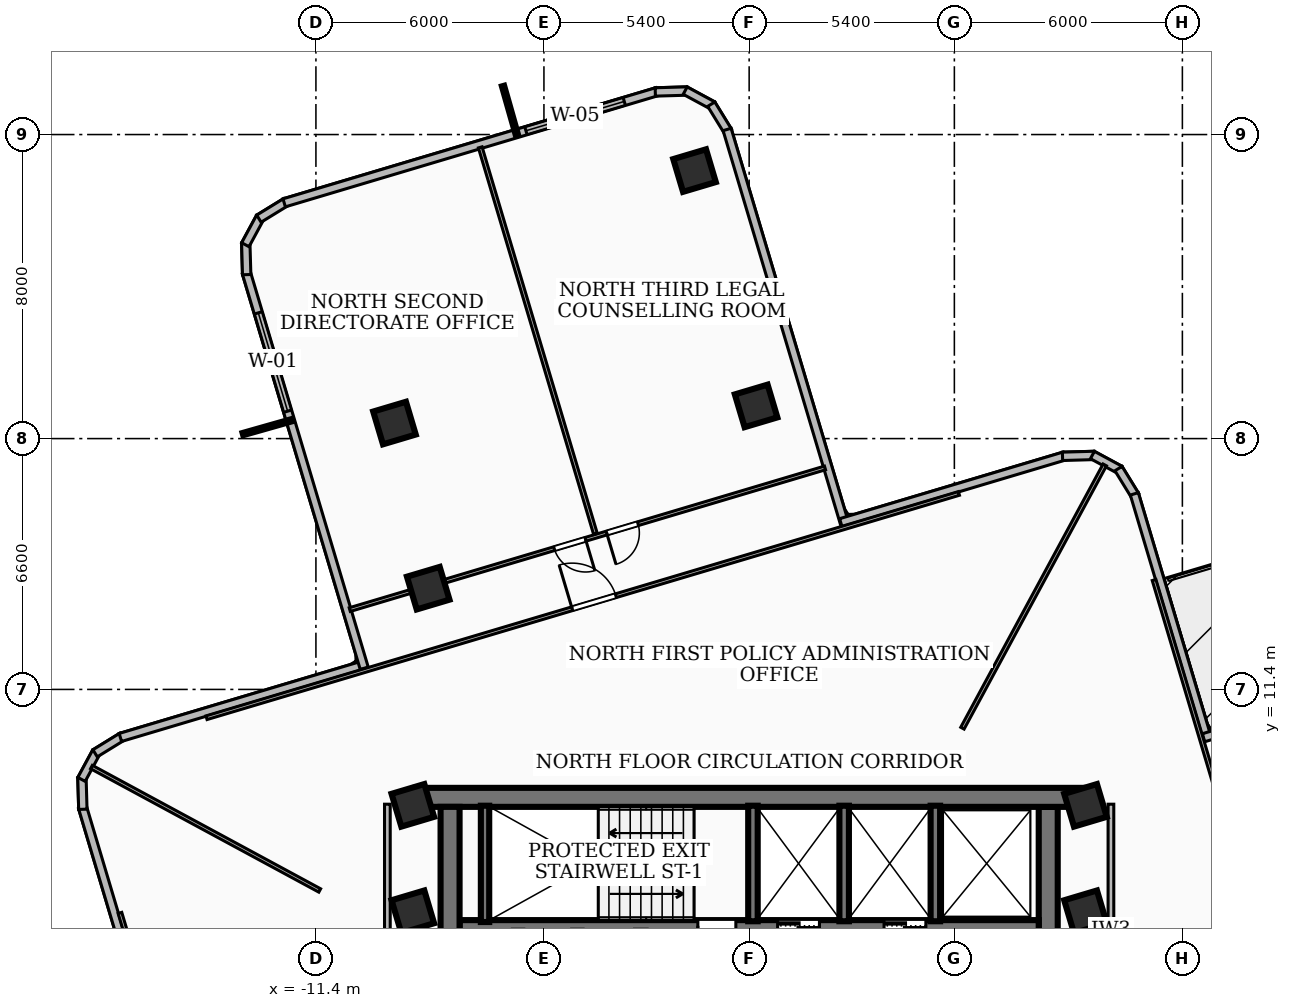
"""IFC4 building model, lengths in metres.
Left out: names, types, materials, properties, quantities, classifications, styles, units other than length and angle.
Written with IfcOpenShell. Run it as: python <this file> out.ifc"""

import sys

from ifc_helpers import new_model, si_unit, direction, frame, frame_2d, origin, origin_2d, place, context, subcontext, project, spatial, rectangle, extrude, element, fill, save


model = new_model("IFC4")
c1 = context("Model", 3, precision=1e-05, world=origin(), true_north=direction((0.0, 1.0)))
c2 = subcontext(c1, "Body", "Model", "MODEL_VIEW")
j1 = project(units=[si_unit("LENGTHUNIT", "METRE"), si_unit("PLANEANGLEUNIT", "RADIAN")], contexts=[c1])
p1 = place(None, origin())
s1 = spatial("IfcSite", under=j1, at=p1, CompositionType="ELEMENT")
p2 = place(p1, origin())
s2 = spatial("IfcBuilding", under=s1, at=p2, CompositionType="ELEMENT")
p3 = place(p2, frame((0.0, 0.0, 141.48)))
s3 = spatial("IfcBuildingStorey", under=s2, at=p3, CompositionType="ELEMENT", Elevation=141.48)
p4 = place(p3, frame((-8.78, 8.56, 0.0), z_axis=(0.0, 0.0, 1.0), x_axis=(1.0, 0.0, 0.0)))
e1 = element("IfcWall", 1, at=p4, inside=s3, PredefinedType="SHEAR", context=c2, shape_type="SweptSolid", body=[
    extrude(rectangle(XDim=17.56, YDim=0.5, at=frame_2d((8.78, 0.0))), origin(), (0.0, 0.0, 1.0), 3.32),
])
for number, where, z_axis, x_axis in (
    (2, (-7.87, 2.0, 0.0), (0.0, 0.0, 1.0), (0.0, 1.0, 0.0)),
    (3, (7.87, 8.31, 0.0), (0.0, 0.0, 1.0), (0.0, -1.0, 0.0)),
):
    element("IfcWall", number, at=place(p3, frame(where, z_axis=z_axis, x_axis=x_axis)), inside=s3, PredefinedType="SHEAR", context=c2, shape_type="SweptSolid", body=[
        extrude(rectangle(XDim=6.31, YDim=0.5, at=frame_2d((3.155, 0.0))), origin(), (0.0, 0.0, 1.0), 3.32),
    ])
p5 = place(p3, frame((7.62, 5.18, 0.0), z_axis=(0.0, 0.0, 1.0), x_axis=(-1.0, 0.0, 0.0)))
e4 = element("IfcWall", 4, at=p5, inside=s3, PredefinedType="SOLIDWALL", context=c2, shape_type="SweptSolid", body=[
    extrude(rectangle(XDim=15.24, YDim=0.3, at=frame_2d((7.62, 0.0))), origin(), (0.0, 0.0, 1.0), 3.32),
])
p6 = place(p5, frame((5.77, 0.0, 0.0)))
e5 = element("IfcOpeningElement", 5, at=p6, cuts=e4, PredefinedType="OPENING", context=c2, shape_type="SweptSolid", body=[
    extrude(rectangle(XDim=1.1, YDim=2.15, at=frame_2d((0.55, 1.075))), frame((0.0, 0.16, 0.0), z_axis=(0.0, -1.0, 0.0), x_axis=(1.0, 0.0, 0.0)), (0.0, 0.0, 1.0), 0.32),
])
p7 = place(p5, frame((2.97, 0.0, 0.0)))
e6 = element("IfcOpeningElement", 6, at=p7, cuts=e4, PredefinedType="OPENING", context=c2, shape_type="SweptSolid", body=[
    extrude(rectangle(XDim=1.1, YDim=2.15, at=frame_2d((0.55, 1.075))), frame((0.0, 0.16, 0.0), z_axis=(0.0, -1.0, 0.0), x_axis=(1.0, 0.0, 0.0)), (0.0, 0.0, 1.0), 0.32),
])
p8 = place(p5, frame((7.97, 0.0, 0.0)))
e7 = element("IfcOpeningElement", 7, at=p8, cuts=e4, PredefinedType="OPENING", context=c2, shape_type="SweptSolid", body=[
    extrude(rectangle(XDim=1.0, YDim=2.1, at=frame_2d((0.5, 1.05))), frame((0.0, 0.16, 0.0), z_axis=(0.0, -1.0, 0.0), x_axis=(1.0, 0.0, 0.0)), (0.0, 0.0, 1.0), 0.32),
])
p9 = place(p3, frame((-6.95, 5.28, 0.0), z_axis=(0.0, 0.0, 1.0), x_axis=(0.0, 1.0, 0.0)))
e8 = element("IfcWall", 8, at=p9, inside=s3, PredefinedType="SOLIDWALL", context=c2, shape_type="SweptSolid", body=[
    extrude(rectangle(XDim=3.06, YDim=0.22, at=frame_2d((1.53, 0.0))), origin(), (0.0, 0.0, 1.0), 3.32),
])
for number, where, z_axis, x_axis in (
    (9, (0.1, 5.3, 0.0), (0.0, 0.0, 1.0), (0.0, 1.0, 0.0)),
    (10, (2.5, 5.3, 0.0), (0.0, 0.0, 1.0), (0.0, 1.0, 0.0)),
    (11, (4.9, 5.3, 0.0), (0.0, 0.0, 1.0), (0.0, 1.0, 0.0)),
):
    element("IfcWall", number, at=place(p3, frame(where, z_axis=z_axis, x_axis=x_axis)), inside=s3, PredefinedType="SOLIDWALL", context=c2, shape_type="SweptSolid", body=[
        extrude(rectangle(XDim=3.04, YDim=0.25, at=frame_2d((1.52, 0.0))), origin(), (0.0, 0.0, 1.0), 3.32),
    ])
for number, where, z_axis, x_axis in (
    (12, (-8.85, 5.55, 0.0), (0.0, 0.0, 1.0), (0.958, 0.286, 0.0)),
    (13, (8.85, 5.55, 0.0), (0.0, 0.0, 1.0), (0.958, 0.286, 0.0)),
    (14, (-8.85, 8.35, 0.0), (0.0, 0.0, 1.0), (0.958, 0.286, 0.0)),
    (15, (8.85, 8.35, 0.0), (0.0, 0.0, 1.0), (0.958, 0.286, 0.0)),
    (16, (0.183, 18.86, 0.0), (0.0, 0.0, 1.0), (0.958, 0.286, 0.0)),
    (17, (-8.445, 14.064, 0.0), (0.0, 0.0, 1.0), (0.958, 0.286, 0.0)),
    (18, (-1.437, 25.052, 0.0), (0.0, 0.0, 1.0), (0.958, 0.286, 0.0)),
    (19, (-9.333, 18.409, 0.0), (0.0, 0.0, 1.0), (0.958, 0.286, 0.0)),
):
    element("IfcColumn", number, at=place(p3, frame(where, z_axis=z_axis, x_axis=x_axis)), inside=s3, PredefinedType="COLUMN", context=c2, shape_type="SweptSolid", body=[
        extrude(rectangle(XDim=0.9, YDim=0.9, at=origin_2d()), origin(), (0.0, 0.0, 1.0), 3.6),
    ])
p10 = place(p3, frame((-15.787, 2.412, 0.0), z_axis=(0.0, 0.0, 1.0), x_axis=(-0.285712854037, 0.958315274342, 0.0)))
e20 = element("IfcWall", 20, at=p10, inside=s3, PredefinedType="SOLIDWALL", context=c2, shape_type="SweptSolid", body=[
    extrude(rectangle(XDim=6.139, YDim=0.22, at=frame_2d((3.069, 0.0))), origin(), (0.0, 0.0, 1.0), 3.32),
])
p11 = place(p3, frame((-17.533, 8.246, 0.0), z_axis=(0.0, 0.0, 1.0), x_axis=(-0.028676726094, 0.999588738122, 0.0)))
e21 = element("IfcWall", 21, at=p11, inside=s3, PredefinedType="SOLIDWALL", context=c2, shape_type="SweptSolid", body=[
    extrude(rectangle(XDim=0.834, YDim=0.22, at=frame_2d((0.417, 0.0))), origin(), (0.0, 0.0, 1.0), 3.32),
])
p12 = place(p3, frame((-17.568, 9.033, 0.0), z_axis=(0.0, 0.0, 1.0), x_axis=(0.475928115507, 0.879484183411, 0.0)))
e22 = element("IfcWall", 22, at=p12, inside=s3, PredefinedType="SOLIDWALL", context=c2, shape_type="SweptSolid", body=[
    extrude(rectangle(XDim=0.82, YDim=0.22, at=frame_2d((0.41, 0.0))), origin(), (0.0, 0.0, 1.0), 3.32),
])
p13 = place(p3, frame((-17.211, 9.719, 0.0), z_axis=(0.0, 0.0, 1.0), x_axis=(0.851597982144, 0.524195456684, 0.0)))
e23 = element("IfcWall", 23, at=p13, inside=s3, PredefinedType="SOLIDWALL", context=c2, shape_type="SweptSolid", body=[
    extrude(rectangle(XDim=0.834, YDim=0.22, at=frame_2d((0.417, 0.0))), origin(), (0.0, 0.0, 1.0), 3.32),
])
p14 = place(p3, frame((-16.546, 10.136, 0.0), z_axis=(0.0, 0.0, 1.0), x_axis=(0.958346765514, 0.285607207592, 0.0)))
e24 = element("IfcWall", 24, at=p14, inside=s3, PredefinedType="SOLIDWALL", context=c2, shape_type="SweptSolid", body=[
    extrude(rectangle(XDim=6.757, YDim=0.22, at=frame_2d((3.379, 0.0))), origin(), (0.0, 0.0, 1.0), 3.32),
])
p15 = place(p3, frame((-10.129, 11.957, 0.0), z_axis=(0.0, 0.0, 1.0), x_axis=(-0.285596101976, 0.958350075148, 0.0)))
e25 = element("IfcWall", 25, at=p15, inside=s3, PredefinedType="SOLIDWALL", context=c2, shape_type="SweptSolid", body=[
    extrude(rectangle(XDim=10.858, YDim=0.22, at=frame_2d((5.429, 0.0))), origin(), (0.0, 0.0, 1.0), 3.32),
])
p16 = place(p15, frame((7.058, 0.0, 0.85)))
e26 = element("IfcOpeningElement", 26, at=p16, cuts=e25, PredefinedType="OPENING", context=c2, shape_type="SweptSolid", body=[
    extrude(rectangle(XDim=2.7, YDim=2.1, at=frame_2d((1.35, 1.05))), frame((0.0, 0.12, 0.0), z_axis=(0.0, -1.0, 0.0), x_axis=(1.0, 0.0, 0.0)), (0.0, 0.0, 1.0), 0.24),
])
p17 = place(p3, frame((-13.222, 22.314, 0.0), z_axis=(0.0, 0.0, 1.0), x_axis=(-0.028969101418, 0.999580307511, 0.0)))
e27 = element("IfcWall", 27, at=p17, inside=s3, PredefinedType="SOLIDWALL", context=c2, shape_type="SweptSolid", body=[
    extrude(rectangle(XDim=0.834, YDim=0.22, at=frame_2d((0.417, 0.0))), origin(), (0.0, 0.0, 1.0), 3.32),
])
p18 = place(p3, frame((-13.257, 23.101, 0.0), z_axis=(0.0, 0.0, 1.0), x_axis=(0.475928115507, 0.879484183411, 0.0)))
e28 = element("IfcWall", 28, at=p18, inside=s3, PredefinedType="SOLIDWALL", context=c2, shape_type="SweptSolid", body=[
    extrude(rectangle(XDim=0.82, YDim=0.22, at=frame_2d((0.41, 0.0))), origin(), (0.0, 0.0, 1.0), 3.32),
])
p19 = place(p3, frame((-12.9, 23.787, 0.0), z_axis=(0.0, 0.0, 1.0), x_axis=(0.852251459863, 0.52313234383, 0.0)))
e29 = element("IfcWall", 29, at=p19, inside=s3, PredefinedType="SOLIDWALL", context=c2, shape_type="SweptSolid", body=[
    extrude(rectangle(XDim=0.833, YDim=0.22, at=frame_2d((0.417, 0.0))), origin(), (0.0, 0.0, 1.0), 3.32),
])
p20 = place(p3, frame((-12.235, 24.203, 0.0), z_axis=(0.0, 0.0, 1.0), x_axis=(0.958315018626, 0.28571371174, 0.0)))
e30 = element("IfcWall", 30, at=p20, inside=s3, PredefinedType="SOLIDWALL", context=c2, shape_type="SweptSolid", body=[
    extrude(rectangle(XDim=10.241, YDim=0.22, at=frame_2d((5.121, 0.0))), origin(), (0.0, 0.0, 1.0), 3.32),
])
p21 = place(p20, frame((6.638, 0.0, 0.85)))
e31 = element("IfcOpeningElement", 31, at=p21, cuts=e30, PredefinedType="OPENING", context=c2, shape_type="SweptSolid", body=[
    extrude(rectangle(XDim=2.7, YDim=1.85, at=frame_2d((1.35, 0.925))), frame((0.0, 0.12, 0.0), z_axis=(0.0, -1.0, 0.0), x_axis=(1.0, 0.0, 0.0)), (0.0, 0.0, 1.0), 0.24),
])
p22 = place(p3, frame((-2.47, 27.121, 0.0), z_axis=(0.0, 0.0, 1.0), x_axis=(0.999588738122, 0.028676726094, 0.0)))
e32 = element("IfcWall", 32, at=p22, inside=s3, PredefinedType="SOLIDWALL", context=c2, shape_type="SweptSolid", body=[
    extrude(rectangle(XDim=0.834, YDim=0.22, at=frame_2d((0.417, 0.0))), origin(), (0.0, 0.0, 1.0), 3.32),
])
p23 = place(p3, frame((-1.683, 27.156, 0.0), z_axis=(0.0, 0.0, 1.0), x_axis=(0.879676210785, -0.475573090259, 0.0)))
e33 = element("IfcWall", 33, at=p23, inside=s3, PredefinedType="SOLIDWALL", context=c2, shape_type="SweptSolid", body=[
    extrude(rectangle(XDim=0.82, YDim=0.22, at=frame_2d((0.41, 0.0))), origin(), (0.0, 0.0, 1.0), 3.32),
])
p24 = place(p3, frame((-0.997, 26.799, 0.0), z_axis=(0.0, 0.0, 1.0), x_axis=(0.524195456684, -0.851597982144, 0.0)))
e34 = element("IfcWall", 34, at=p24, inside=s3, PredefinedType="SOLIDWALL", context=c2, shape_type="SweptSolid", body=[
    extrude(rectangle(XDim=0.834, YDim=0.22, at=frame_2d((0.417, 0.0))), origin(), (0.0, 0.0, 1.0), 3.32),
])
p25 = place(p3, frame((-0.58, 26.134, 0.0), z_axis=(0.0, 0.0, 1.0), x_axis=(0.285596101976, -0.958350075148, 0.0)))
e35 = element("IfcWall", 35, at=p25, inside=s3, PredefinedType="SOLIDWALL", context=c2, shape_type="SweptSolid", body=[
    extrude(rectangle(XDim=10.858, YDim=0.22, at=frame_2d((5.429, 0.0))), origin(), (0.0, 0.0, 1.0), 2.55),
])
p26 = place(p3, frame((2.412, 15.787, 0.0), z_axis=(0.0, 0.0, 1.0), x_axis=(0.958315274342, 0.285712854037, 0.0)))
e36 = element("IfcWall", 36, at=p26, inside=s3, PredefinedType="SOLIDWALL", context=c2, shape_type="SweptSolid", body=[
    extrude(rectangle(XDim=6.139, YDim=0.22, at=frame_2d((3.069, 0.0))), origin(), (0.0, 0.0, 1.0), 2.55),
])
p27 = place(p3, frame((8.246, 17.533, 0.0), z_axis=(0.0, 0.0, 1.0), x_axis=(0.999588738122, 0.028676726094, 0.0)))
e37 = element("IfcWall", 37, at=p27, inside=s3, PredefinedType="SOLIDWALL", context=c2, shape_type="SweptSolid", body=[
    extrude(rectangle(XDim=0.834, YDim=0.22, at=frame_2d((0.417, 0.0))), origin(), (0.0, 0.0, 1.0), 3.32),
])
p28 = place(p3, frame((9.033, 17.568, 0.0), z_axis=(0.0, 0.0, 1.0), x_axis=(0.879484183411, -0.475928115507, 0.0)))
e38 = element("IfcWall", 38, at=p28, inside=s3, PredefinedType="SOLIDWALL", context=c2, shape_type="SweptSolid", body=[
    extrude(rectangle(XDim=0.82, YDim=0.22, at=frame_2d((0.41, 0.0))), origin(), (0.0, 0.0, 1.0), 3.32),
])
p29 = place(p3, frame((9.719, 17.211, 0.0), z_axis=(0.0, 0.0, 1.0), x_axis=(0.524195456684, -0.851597982144, 0.0)))
e39 = element("IfcWall", 39, at=p29, inside=s3, PredefinedType="SOLIDWALL", context=c2, shape_type="SweptSolid", body=[
    extrude(rectangle(XDim=0.834, YDim=0.22, at=frame_2d((0.417, 0.0))), origin(), (0.0, 0.0, 1.0), 3.32),
])
p30 = place(p3, frame((10.136, 16.546, 0.0), z_axis=(0.0, 0.0, 1.0), x_axis=(0.285607207592, -0.958346765514, 0.0)))
e40 = element("IfcWall", 40, at=p30, inside=s3, PredefinedType="SOLIDWALL", context=c2, shape_type="SweptSolid", body=[
    extrude(rectangle(XDim=6.757, YDim=0.22, at=frame_2d((3.379, 0.0))), origin(), (0.0, 0.0, 1.0), 2.7),
])
p31 = place(p3, frame((11.957, 10.129, 0.0), z_axis=(0.0, 0.0, 1.0), x_axis=(0.958343962332, 0.285616613419, 0.0)))
e41 = element("IfcWall", 41, at=p31, inside=s3, PredefinedType="SOLIDWALL", context=c2, shape_type="SweptSolid", body=[
    extrude(rectangle(XDim=13.458, YDim=0.22, at=frame_2d((6.729, 0.0))), origin(), (0.0, 0.0, 1.0), 2.7),
])
p32 = place(p31, frame((4.4, 0.0, 0.0)))
e42 = element("IfcOpeningElement", 42, at=p32, cuts=e41, PredefinedType="OPENING", context=c2, shape_type="SweptSolid", body=[
    extrude(rectangle(XDim=1.1, YDim=2.1, at=frame_2d((0.55, 1.05))), frame((0.0, 0.12, 0.0), z_axis=(0.0, -1.0, 0.0), x_axis=(1.0, 0.0, 0.0)), (0.0, 0.0, 1.0), 0.24),
])
for number, where, z_axis, x_axis in (
    (43, (-9.52, 1.75, 0.0), (0.0, 0.0, 1.0), (0.0, 1.0, 0.0)),
    (44, (9.52, 1.75, 0.0), (0.0, 0.0, 1.0), (0.0, 1.0, 0.0)),
):
    element("IfcWall", number, at=place(p3, frame(where, z_axis=z_axis, x_axis=x_axis)), inside=s3, PredefinedType="PARTITIONING", context=c2, shape_type="SweptSolid", body=[
        extrude(rectangle(XDim=6.63, YDim=0.15, at=frame_2d((3.315, 0.0))), origin(), (0.0, 0.0, 1.0), 2.55),
    ])
p33 = place(p3, frame((5.612, 10.38, 0.0), z_axis=(0.0, 0.0, 1.0), x_axis=(0.475666815962, 0.879625534073, 0.0)))
e45 = element("IfcWall", 45, at=p33, inside=s3, PredefinedType="PARTITIONING", context=c2, shape_type="SweptSolid", body=[
    extrude(rectangle(XDim=7.875, YDim=0.1, at=frame_2d((3.938, 0.0))), origin(), (0.0, 0.0, 1.0), 2.55),
])
p34 = place(p3, frame((-11.3, 6.11, 0.0), z_axis=(0.0, 0.0, 1.0), x_axis=(-0.879653556483, 0.475614991948, 0.0)))
e46 = element("IfcWall", 46, at=p34, inside=s3, PredefinedType="PARTITIONING", context=c2, shape_type="SweptSolid", body=[
    extrude(rectangle(XDim=6.829, YDim=0.1, at=frame_2d((3.414, 0.0))), origin(), (0.0, 0.0, 1.0), 3.32),
])
p35 = place(p3, frame((10.655, 14.279, 0.0), z_axis=(0.0, 0.0, 1.0), x_axis=(0.285665949025, -0.958329257389, 0.0)))
e47 = element("IfcWall", 47, at=p35, inside=s3, PredefinedType="PARTITIONING", context=c2, shape_type="SweptSolid", body=[
    extrude(rectangle(XDim=20.66, YDim=0.1, at=frame_2d((10.33, 0.0))), origin(), (0.0, 0.0, 1.0), 2.55),
])
p36 = place(p35, frame((10.04, 0.0, 0.0)))
e48 = element("IfcOpeningElement", 48, at=p36, cuts=e47, PredefinedType="OPENING", context=c2, shape_type="SweptSolid", body=[
    extrude(rectangle(XDim=1.2, YDim=2.1, at=frame_2d((0.6, 1.05))), frame((0.0, 0.06, 0.0), z_axis=(0.0, -1.0, 0.0), x_axis=(1.0, 0.0, 0.0)), (0.0, 0.0, 1.0), 0.12),
])
p37 = place(p3, frame((-14.279, 10.655, 0.0), z_axis=(0.0, 0.0, 1.0), x_axis=(0.958329257389, 0.285665949025, 0.0)))
e49 = element("IfcWall", 49, at=p37, inside=s3, PredefinedType="PARTITIONING", context=c2, shape_type="SweptSolid", body=[
    extrude(rectangle(XDim=20.66, YDim=0.1, at=frame_2d((10.33, 0.0))), origin(), (0.0, 0.0, 1.0), 2.55),
])
p38 = place(p37, frame((10.04, 0.0, 0.0)))
e50 = element("IfcOpeningElement", 50, at=p38, cuts=e49, PredefinedType="OPENING", context=c2, shape_type="SweptSolid", body=[
    extrude(rectangle(XDim=1.2, YDim=2.1, at=frame_2d((0.6, 1.05))), frame((0.0, 0.06, 0.0), z_axis=(0.0, -1.0, 0.0), x_axis=(1.0, 0.0, 0.0)), (0.0, 0.0, 1.0), 0.12),
])
p39 = place(p3, frame((-4.044, 15.49, 0.0), z_axis=(0.0, 0.0, 1.0), x_axis=(-0.285623556367, 0.958341893088, 0.0)))
e51 = element("IfcWall", 51, at=p39, inside=s3, PredefinedType="PARTITIONING", context=c2, shape_type="SweptSolid", body=[
    extrude(rectangle(XDim=10.615, YDim=0.1, at=frame_2d((5.308, 0.0))), origin(), (0.0, 0.0, 1.0), 2.812),
])
p40 = place(p3, frame((1.996, 17.228, 0.0), z_axis=(0.0, 0.0, 1.0), x_axis=(-0.958326854981, -0.285674008308, 0.0)))
e52 = element("IfcWall", 52, at=p40, inside=s3, PredefinedType="PARTITIONING", context=c2, shape_type="SweptSolid", body=[
    extrude(rectangle(XDim=13.05, YDim=0.1, at=frame_2d((6.525, 0.0))), origin(), (0.0, 0.0, 1.0), 2.55),
])
p41 = place(p40, frame((5.135, 0.0, 0.0)))
e53 = element("IfcOpeningElement", 53, at=p41, cuts=e52, PredefinedType="OPENING", context=c2, shape_type="SweptSolid", body=[
    extrude(rectangle(XDim=0.86, YDim=2.04, at=frame_2d((0.43, 1.02))), frame((0.0, 0.06, 0.0), z_axis=(0.0, -1.0, 0.0), x_axis=(1.0, 0.0, 0.0)), (0.0, 0.0, 1.0), 0.12),
])
p42 = place(p40, frame((6.575, 0.0, 0.0)))
e54 = element("IfcOpeningElement", 54, at=p42, cuts=e52, PredefinedType="OPENING", context=c2, shape_type="SweptSolid", body=[
    extrude(rectangle(XDim=0.86, YDim=2.04, at=frame_2d((0.43, 1.02))), frame((0.0, 0.06, 0.0), z_axis=(0.0, -1.0, 0.0), x_axis=(1.0, 0.0, 0.0)), (0.0, 0.0, 1.0), 0.12),
])
p43 = place(p3, frame((-10.655, -14.279, 0.0), z_axis=(0.0, 0.0, 1.0), x_axis=(-0.285665949025, 0.958329257389, 0.0)))
e55 = element("IfcWall", 55, at=p43, inside=s3, PredefinedType="PARTITIONING", context=c2, shape_type="SweptSolid", body=[
    extrude(rectangle(XDim=20.66, YDim=0.1, at=frame_2d((10.33, 0.0))), origin(), (0.0, 0.0, 1.0), 2.55),
])
p44 = place(p43, frame((10.04, 0.0, 0.0)))
e56 = element("IfcOpeningElement", 56, at=p44, cuts=e55, PredefinedType="OPENING", context=c2, shape_type="SweptSolid", body=[
    extrude(rectangle(XDim=1.2, YDim=2.1, at=frame_2d((0.6, 1.05))), frame((0.0, 0.06, 0.0), z_axis=(0.0, -1.0, 0.0), x_axis=(1.0, 0.0, 0.0)), (0.0, 0.0, 1.0), 0.12),
])
p45 = place(p16, origin())
e57 = element("IfcWindow", 57, at=p45, inside=s3, PartitioningType="SINGLE_PANEL", PredefinedType="WINDOW", context=c2, shape_type="SweptSolid", body=[
    extrude(rectangle(XDim=2.7, YDim=2.1, at=frame_2d((1.35, 1.05))), frame((0.0, 0.03, 0.0), z_axis=(0.0, -1.0, 0.0), x_axis=(1.0, 0.0, 0.0)), (0.0, 0.0, 1.0), 0.06),
])
fill(e26, e57)
p46 = place(p21, origin())
e58 = element("IfcWindow", 58, at=p46, inside=s3, PartitioningType="SINGLE_PANEL", PredefinedType="WINDOW", context=c2, shape_type="SweptSolid", body=[
    extrude(rectangle(XDim=2.7, YDim=1.85, at=frame_2d((1.35, 0.925))), frame((0.0, 0.03, 0.0), z_axis=(0.0, -1.0, 0.0), x_axis=(1.0, 0.0, 0.0)), (0.0, 0.0, 1.0), 0.06),
])
fill(e31, e58)
p47 = place(p6, origin())
e59 = element("IfcDoor", 59, at=p47, inside=s3, OperationType="DOUBLE_DOOR_SLIDING", PredefinedType="DOOR", context=c2, shape_type="SweptSolid", body=[
    extrude(rectangle(XDim=1.1, YDim=2.15, at=frame_2d((0.55, 1.075))), frame((0.0, 0.025, 0.0), z_axis=(0.0, -1.0, 0.0), x_axis=(1.0, 0.0, 0.0)), (0.0, 0.0, 1.0), 0.05),
])
fill(e5, e59)
p48 = place(p7, origin())
e60 = element("IfcDoor", 60, at=p48, inside=s3, OperationType="DOUBLE_DOOR_SLIDING", PredefinedType="DOOR", context=c2, shape_type="SweptSolid", body=[
    extrude(rectangle(XDim=1.1, YDim=2.15, at=frame_2d((0.55, 1.075))), frame((0.0, 0.025, 0.0), z_axis=(0.0, -1.0, 0.0), x_axis=(1.0, 0.0, 0.0)), (0.0, 0.0, 1.0), 0.05),
])
fill(e6, e60)
p49 = place(p8, origin())
e61 = element("IfcDoor", 61, at=p49, inside=s3, OperationType="SINGLE_SWING_RIGHT", PredefinedType="DOOR", context=c2, shape_type="SweptSolid", body=[
    extrude(rectangle(XDim=1.0, YDim=2.1, at=frame_2d((0.5, 1.05))), frame((0.0, 0.025, 0.0), z_axis=(0.0, -1.0, 0.0), x_axis=(1.0, 0.0, 0.0)), (0.0, 0.0, 1.0), 0.05),
])
fill(e7, e61)
p50 = place(p38, origin())
e62 = element("IfcDoor", 62, at=p50, inside=s3, OperationType="SINGLE_SWING_LEFT", PredefinedType="DOOR", context=c2, shape_type="SweptSolid", body=[
    extrude(rectangle(XDim=1.2, YDim=2.1, at=frame_2d((0.6, 1.05))), frame((0.0, 0.025, 0.0), z_axis=(0.0, -1.0, 0.0), x_axis=(1.0, 0.0, 0.0)), (0.0, 0.0, 1.0), 0.05),
])
fill(e50, e62)
p51 = place(p41, origin())
e63 = element("IfcDoor", 63, at=p51, inside=s3, OperationType="SINGLE_SWING_RIGHT", PredefinedType="DOOR", context=c2, shape_type="SweptSolid", body=[
    extrude(rectangle(XDim=0.86, YDim=2.04, at=frame_2d((0.43, 1.02))), frame((0.0, 0.025, 0.0), z_axis=(0.0, -1.0, 0.0), x_axis=(1.0, 0.0, 0.0)), (0.0, 0.0, 1.0), 0.05),
])
fill(e53, e63)
p52 = place(p42, origin())
e64 = element("IfcDoor", 64, at=p52, inside=s3, OperationType="SINGLE_SWING_LEFT", PredefinedType="DOOR", context=c2, shape_type="SweptSolid", body=[
    extrude(rectangle(XDim=0.86, YDim=2.04, at=frame_2d((0.43, 1.02))), frame((0.0, 0.025, 0.0), z_axis=(0.0, -1.0, 0.0), x_axis=(1.0, 0.0, 0.0)), (0.0, 0.0, 1.0), 0.05),
])
fill(e54, e64)
save(model, sys.argv[1])
